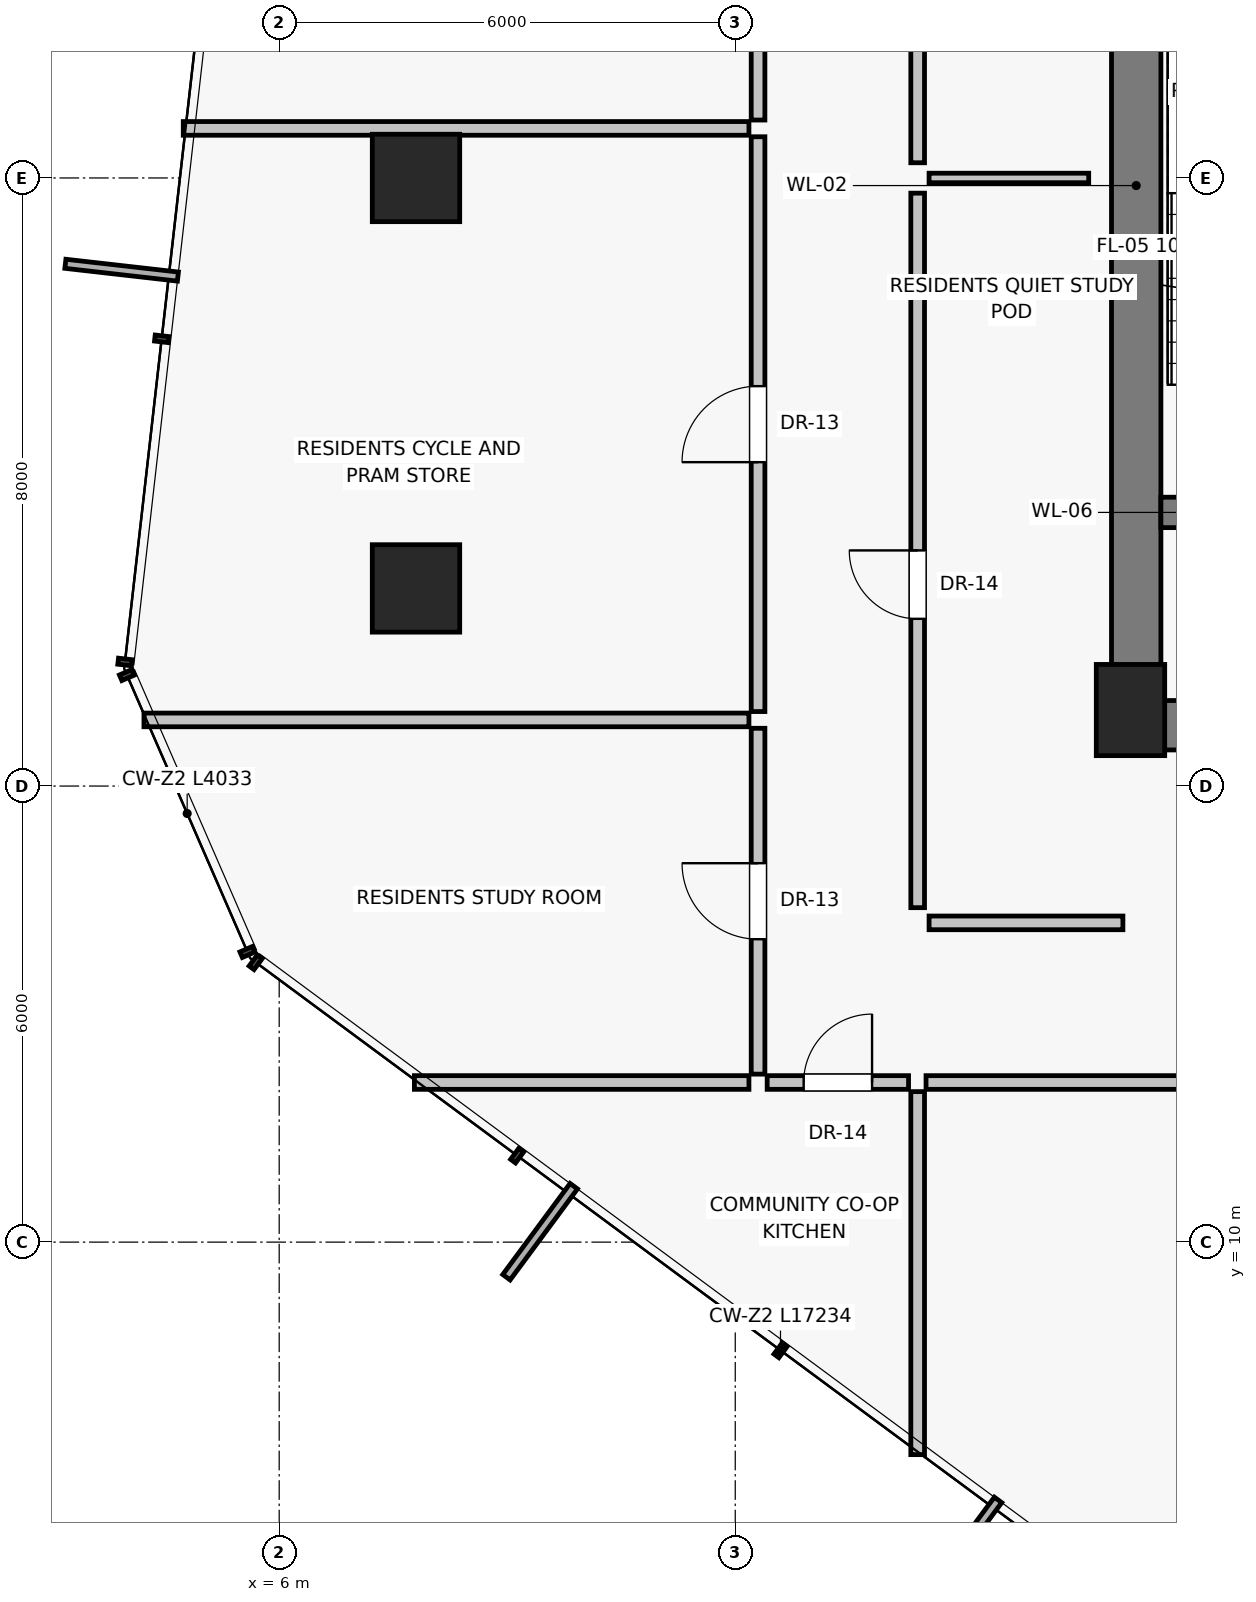
"""IFC4 building model, lengths in metres.
Left out: names, types, materials, properties, quantities, classifications, styles, units other than length and angle.
Written with IfcOpenShell. Run it as: python <this file> out.ifc"""

import sys

from ifc_helpers import new_model, si_unit, direction, frame, frame_2d, origin, origin_2d, place, context, subcontext, project, spatial, rectangle, extrude, source, transform, mapped, element, fill, save


model = new_model("IFC4")
c1 = context("Model", 3, precision=1e-05, world=origin(), true_north=direction((0.0, 1.0)))
c2 = subcontext(c1, "Body", "Model", "MODEL_VIEW")
j1 = project(units=[si_unit("LENGTHUNIT", "METRE"), si_unit("PLANEANGLEUNIT", "RADIAN")], contexts=[c1])
p1 = place(None, origin())
s1 = spatial("IfcSite", under=j1, at=p1, CompositionType="ELEMENT")
p2 = place(p1, origin())
s2 = spatial("IfcBuilding", under=s1, at=p2, CompositionType="ELEMENT")
p3 = place(p2, frame((0.0, 0.0, 105.7)))
s3 = spatial("IfcBuildingStorey", under=s2, at=p3, CompositionType="ELEMENT", Elevation=105.7)
p4 = place(p3, frame((17.2, 17.0, 0.0), z_axis=(0.0, 0.0, 1.0), x_axis=(1.0, 0.0, 0.0)))
e1 = element("IfcColumn", 1, at=p4, inside=s3, PredefinedType="PILASTER", context=c2, shape_type="SweptSolid", body=[
    extrude(rectangle(XDim=0.9, YDim=1.2, at=origin_2d()), origin(), (0.0, 0.0, 1.0), 3.25),
])
for number, where, z_axis, x_axis in (
    (2, (7.8, 24.0, 0.0), (0.0, 0.0, 1.0), (1.0, 0.0, 0.0)),
    (3, (7.8, 18.6, 0.0), (0.0, 0.0, 1.0), (1.0, 0.0, 0.0)),
):
    element("IfcColumn", number, at=place(p3, frame(where, z_axis=z_axis, x_axis=x_axis)), inside=s3, PredefinedType="COLUMN", context=c2, shape_type="SweptSolid", body=[
        extrude(rectangle(XDim=1.15, YDim=1.15, at=origin_2d()), origin(), (0.0, 0.0, 1.0), 3.25),
    ])
p5 = place(p3, frame((17.275, 16.8, 0.0), z_axis=(0.0, 0.0, 1.0), x_axis=(0.0, 1.0, 0.0)))
e4 = element("IfcWall", 4, at=p5, inside=s3, PredefinedType="SHEAR", context=c2, shape_type="SweptSolid", body=[
    extrude(rectangle(XDim=14.2, YDim=0.65, at=frame_2d((7.1, 0.0))), origin(), (0.0, 0.0, 1.0), 2.97),
])
p6 = place(p3, frame((17.2, 16.8, 0.0), z_axis=(0.0, 0.0, 1.0), x_axis=(1.0, 0.0, 0.0)))
e5 = element("IfcWall", 5, at=p6, inside=s3, PredefinedType="SHEAR", context=c2, shape_type="SweptSolid", body=[
    extrude(rectangle(XDim=5.85, YDim=0.65, at=frame_2d((2.925, 0.0))), origin(), (0.0, 0.0, 1.0), 2.97),
])
p7 = place(p6, frame((1.15, 0.0, 0.0)))
e6 = element("IfcOpeningElement", 6, at=p7, cuts=e5, PredefinedType="OPENING", context=c2, shape_type="SweptSolid", body=[
    extrude(rectangle(XDim=1.2, YDim=2.03, at=frame_2d((0.6, 1.015))), frame((0.0, 0.335, 0.0), z_axis=(0.0, -1.0, 0.0), x_axis=(1.0, 0.0, 0.0)), (0.0, 0.0, 1.0), 0.67),
])
p8 = place(p3, frame((17.6, 19.6, 0.0), z_axis=(0.0, 0.0, 1.0), x_axis=(1.0, 0.0, 0.0)))
e7 = element("IfcWall", 7, at=p8, inside=s3, PredefinedType="SHEAR", context=c2, shape_type="SweptSolid", body=[
    extrude(rectangle(XDim=3.4, YDim=0.4, at=frame_2d((1.7, 0.0))), origin(), (0.0, 0.0, 1.0), 2.97),
])
p9 = place(p8, frame((1.05, 0.0, 0.0)))
e8 = element("IfcOpeningElement", 8, at=p9, cuts=e7, PredefinedType="OPENING", context=c2, shape_type="SweptSolid", body=[
    extrude(rectangle(XDim=1.1, YDim=2.03, at=frame_2d((0.55, 1.015))), frame((0.0, 0.21, 0.0), z_axis=(0.0, -1.0, 0.0), x_axis=(1.0, 0.0, 0.0)), (0.0, 0.0, 1.0), 0.42),
])
p10 = place(p3, frame((14.4, 14.4, 0.0), z_axis=(0.0, 0.0, 1.0), x_axis=(0.0, 1.0, 0.0)))
e9 = element("IfcWall", 9, at=p10, inside=s3, PredefinedType="PARTITIONING", context=c2, shape_type="SweptSolid", body=[
    extrude(rectangle(XDim=9.4, YDim=0.18, at=frame_2d((4.7, 0.0))), origin(), (0.0, 0.0, 1.0), 2.97),
])
p11 = place(p10, frame((3.8, 0.0, 0.0)))
e10 = element("IfcOpeningElement", 10, at=p11, cuts=e9, PredefinedType="OPENING", context=c2, shape_type="SweptSolid", body=[
    extrude(rectangle(XDim=0.9, YDim=2.01, at=frame_2d((0.45, 1.005))), frame((0.0, 0.1, 0.0), z_axis=(0.0, -1.0, 0.0), x_axis=(1.0, 0.0, 0.0)), (0.0, 0.0, 1.0), 0.2),
])
p12 = place(p3, frame((14.4, 24.2, 0.0), z_axis=(0.0, 0.0, 1.0), x_axis=(0.0, 1.0, 0.0)))
e11 = element("IfcWall", 11, at=p12, inside=s3, PredefinedType="PARTITIONING", context=c2, shape_type="SweptSolid", body=[
    extrude(rectangle(XDim=9.2, YDim=0.18, at=frame_2d((4.6, 0.0))), origin(), (0.0, 0.0, 1.0), 2.97),
])
p13 = place(p12, frame((3.8, 0.0, 0.0)))
e12 = element("IfcOpeningElement", 12, at=p13, cuts=e11, PredefinedType="OPENING", context=c2, shape_type="SweptSolid", body=[
    extrude(rectangle(XDim=0.9, YDim=2.01, at=frame_2d((0.45, 1.005))), frame((0.0, 0.1, 0.0), z_axis=(0.0, -1.0, 0.0), x_axis=(1.0, 0.0, 0.0)), (0.0, 0.0, 1.0), 0.2),
])
p14 = place(p3, frame((14.55, 24.0, 0.0), z_axis=(0.0, 0.0, 1.0), x_axis=(1.0, 0.0, 0.0)))
e13 = element("IfcWall", 13, at=p14, inside=s3, PredefinedType="PARTITIONING", context=c2, shape_type="SweptSolid", body=[
    extrude(rectangle(XDim=2.1, YDim=0.125, at=frame_2d((1.05, 0.0))), origin(), (0.0, 0.0, 1.0), 2.97),
])
p15 = place(p3, frame((14.55, 14.2, 0.0), z_axis=(0.0, 0.0, 1.0), x_axis=(1.0, 0.0, 0.0)))
e14 = element("IfcWall", 14, at=p15, inside=s3, PredefinedType="PARTITIONING", context=c2, shape_type="SweptSolid", body=[
    extrude(rectangle(XDim=2.55, YDim=0.18, at=frame_2d((1.275, 0.0))), origin(), (0.0, 0.0, 1.0), 2.97),
])
p16 = place(p3, frame((14.4, 11.98, 0.0), z_axis=(0.0, 0.0, 1.0), x_axis=(0.0, -1.0, 0.0)))
e15 = element("IfcWall", 15, at=p16, inside=s3, PredefinedType="PARTITIONING", context=c2, shape_type="SweptSolid", body=[
    extrude(rectangle(XDim=4.776, YDim=0.18, at=frame_2d((2.388, 0.0))), origin(), (0.0, 0.0, 1.0), 2.97),
])
p17 = place(p3, frame((14.51, 12.1, 0.0), z_axis=(0.0, 0.0, 1.0), x_axis=(1.0, 0.0, 0.0)))
e16 = element("IfcWall", 16, at=p17, inside=s3, PredefinedType="PARTITIONING", context=c2, shape_type="SweptSolid", body=[
    extrude(rectangle(XDim=9.824, YDim=0.18, at=frame_2d((4.912, 0.0))), origin(), (0.0, 0.0, 1.0), 2.55),
])
p18 = place(p17, frame((4.012, 0.0, 0.0)))
e17 = element("IfcOpeningElement", 17, at=p18, cuts=e16, PredefinedType="OPENING", context=c2, shape_type="SweptSolid", body=[
    extrude(rectangle(XDim=1.8, YDim=2.25, at=frame_2d((0.9, 1.125))), frame((0.0, 0.1, 0.0), z_axis=(0.0, -1.0, 0.0), x_axis=(1.0, 0.0, 0.0)), (0.0, 0.0, 1.0), 0.2),
])
p19 = place(p3, frame((12.18, 12.1, 0.0), z_axis=(0.0, 0.0, 1.0), x_axis=(-1.0, 0.0, 0.0)))
e18 = element("IfcWall", 18, at=p19, inside=s3, PredefinedType="PARTITIONING", context=c2, shape_type="SweptSolid", body=[
    extrude(rectangle(XDim=4.401, YDim=0.18, at=frame_2d((2.201, 0.0))), origin(), (0.0, 0.0, 1.0), 2.97),
])
p20 = place(p3, frame((12.3, 12.21, 0.0), z_axis=(0.0, 0.0, 1.0), x_axis=(0.0, 1.0, 0.0)))
e19 = element("IfcWall", 19, at=p20, inside=s3, PredefinedType="PARTITIONING", context=c2, shape_type="SweptSolid", body=[
    extrude(rectangle(XDim=4.55, YDim=0.18, at=frame_2d((2.275, 0.0))), origin(), (0.0, 0.0, 1.0), 2.97),
])
p21 = place(p20, frame((1.775, 0.0, 0.0)))
e20 = element("IfcOpeningElement", 20, at=p21, cuts=e19, PredefinedType="OPENING", context=c2, shape_type="SweptSolid", body=[
    extrude(rectangle(XDim=1.0, YDim=2.01, at=frame_2d((0.5, 1.005))), frame((0.0, 0.1, 0.0), z_axis=(0.0, -1.0, 0.0), x_axis=(1.0, 0.0, 0.0)), (0.0, 0.0, 1.0), 0.2),
])
p22 = place(p3, frame((12.3, 16.98, 0.0), z_axis=(0.0, 0.0, 1.0), x_axis=(0.0, 1.0, 0.0)))
e21 = element("IfcWall", 21, at=p22, inside=s3, PredefinedType="PARTITIONING", context=c2, shape_type="SweptSolid", body=[
    extrude(rectangle(XDim=7.562, YDim=0.18, at=frame_2d((3.781, 0.0))), origin(), (0.0, 0.0, 1.0), 2.55),
])
p23 = place(p22, frame((3.281, 0.0, 0.0)))
e22 = element("IfcOpeningElement", 22, at=p23, cuts=e21, PredefinedType="OPENING", context=c2, shape_type="SweptSolid", body=[
    extrude(rectangle(XDim=1.0, YDim=2.01, at=frame_2d((0.5, 1.005))), frame((0.0, 0.1, 0.0), z_axis=(0.0, -1.0, 0.0), x_axis=(1.0, 0.0, 0.0)), (0.0, 0.0, 1.0), 0.2),
])
p24 = place(p3, frame((12.18, 16.87, 0.0), z_axis=(0.0, 0.0, 1.0), x_axis=(-1.0, 0.0, 0.0)))
e23 = element("IfcWall", 23, at=p24, inside=s3, PredefinedType="PARTITIONING", context=c2, shape_type="SweptSolid", body=[
    extrude(rectangle(XDim=7.959, YDim=0.18, at=frame_2d((3.979, 0.0))), origin(), (0.0, 0.0, 1.0), 2.97),
])
p25 = place(p3, frame((12.18, 24.652, 0.0), z_axis=(0.0, 0.0, 1.0), x_axis=(-1.0, 0.0, 0.0)))
e24 = element("IfcWall", 24, at=p25, inside=s3, PredefinedType="PARTITIONING", context=c2, shape_type="SweptSolid", body=[
    extrude(rectangle(XDim=7.442, YDim=0.18, at=frame_2d((3.721, 0.0))), origin(), (0.0, 0.0, 1.0), 2.97),
])
p26 = place(p3, frame((12.3, 24.762, 0.0), z_axis=(0.0, 0.0, 1.0), x_axis=(0.0, 1.0, 0.0)))
e25 = element("IfcWall", 25, at=p26, inside=s3, PredefinedType="PARTITIONING", context=c2, shape_type="SweptSolid", body=[
    extrude(rectangle(XDim=3.978, YDim=0.18, at=frame_2d((1.989, 0.0))), origin(), (0.0, 0.0, 1.0), 2.55),
])
p27 = place(p26, frame((1.489, 0.0, 0.0)))
e26 = element("IfcOpeningElement", 26, at=p27, cuts=e25, PredefinedType="OPENING", context=c2, shape_type="SweptSolid", body=[
    extrude(rectangle(XDim=1.0, YDim=2.01, at=frame_2d((0.5, 1.005))), frame((0.0, 0.1, 0.0), z_axis=(0.0, -1.0, 0.0), x_axis=(1.0, 0.0, 0.0)), (0.0, 0.0, 1.0), 0.2),
])
p28 = place(p3, frame((12.42, 12.1, 0.0), z_axis=(0.0, 0.0, 1.0), x_axis=(1.0, 0.0, 0.0)))
e27 = element("IfcWall", 27, at=p28, inside=s3, PredefinedType="PARTITIONING", context=c2, shape_type="SweptSolid", body=[
    extrude(rectangle(XDim=1.86, YDim=0.18, at=frame_2d((0.93, 0.0))), origin(), (0.0, 0.0, 1.0), 2.97),
])
p29 = place(p28, frame((0.48, 0.0, 0.0)))
e28 = element("IfcOpeningElement", 28, at=p29, cuts=e27, PredefinedType="OPENING", context=c2, shape_type="SweptSolid", body=[
    extrude(rectangle(XDim=0.9, YDim=2.01, at=frame_2d((0.45, 1.005))), frame((0.0, 0.1, 0.0), z_axis=(0.0, -1.0, 0.0), x_axis=(1.0, 0.0, 0.0)), (0.0, 0.0, 1.0), 0.2),
])
m1 = source(origin(), c2, "Body", "SweptSolid", [
    extrude(rectangle(XDim=0.9, YDim=2.01, at=frame_2d((0.45, 1.005))), frame((0.0, 0.025, 0.0), z_axis=(0.0, -1.0, 0.0), x_axis=(1.0, 0.0, 0.0)), (0.0, 0.0, 1.0), 0.05),
])
p30 = place(p11, origin())
e29 = element("IfcDoor", 29, at=p30, inside=s3, OperationType="SINGLE_SWING_RIGHT", PredefinedType="DOOR", context=c2, shape_type="MappedRepresentation", body=[
    mapped(m1, transform((0.0, 0.0, 0.0), scale=1.0)),
])
fill(e10, e29)
m2 = source(origin(), c2, "Body", "SweptSolid", [
    extrude(rectangle(XDim=1.0, YDim=2.01, at=frame_2d((0.5, 1.005))), frame((0.0, 0.025, 0.0), z_axis=(0.0, -1.0, 0.0), x_axis=(1.0, 0.0, 0.0)), (0.0, 0.0, 1.0), 0.05),
])
p31 = place(p21, origin())
e30 = element("IfcDoor", 30, at=p31, inside=s3, OperationType="SINGLE_SWING_RIGHT", PredefinedType="DOOR", context=c2, shape_type="MappedRepresentation", body=[
    mapped(m2, transform((0.0, 0.0, 0.0), scale=1.0)),
])
fill(e20, e30)
p32 = place(p23, origin())
e31 = element("IfcDoor", 31, at=p32, inside=s3, OperationType="SINGLE_SWING_LEFT", PredefinedType="DOOR", context=c2, shape_type="MappedRepresentation", body=[
    mapped(m2, transform((0.0, 0.0, 0.0), scale=1.0)),
])
fill(e22, e31)
p33 = place(p29, origin())
e32 = element("IfcDoor", 32, at=p33, inside=s3, OperationType="SINGLE_SWING_RIGHT", PredefinedType="DOOR", context=c2, shape_type="MappedRepresentation", body=[
    mapped(m1, transform((0.0, 0.0, 0.0), scale=1.0)),
])
fill(e28, e32)
save(model, sys.argv[1])
